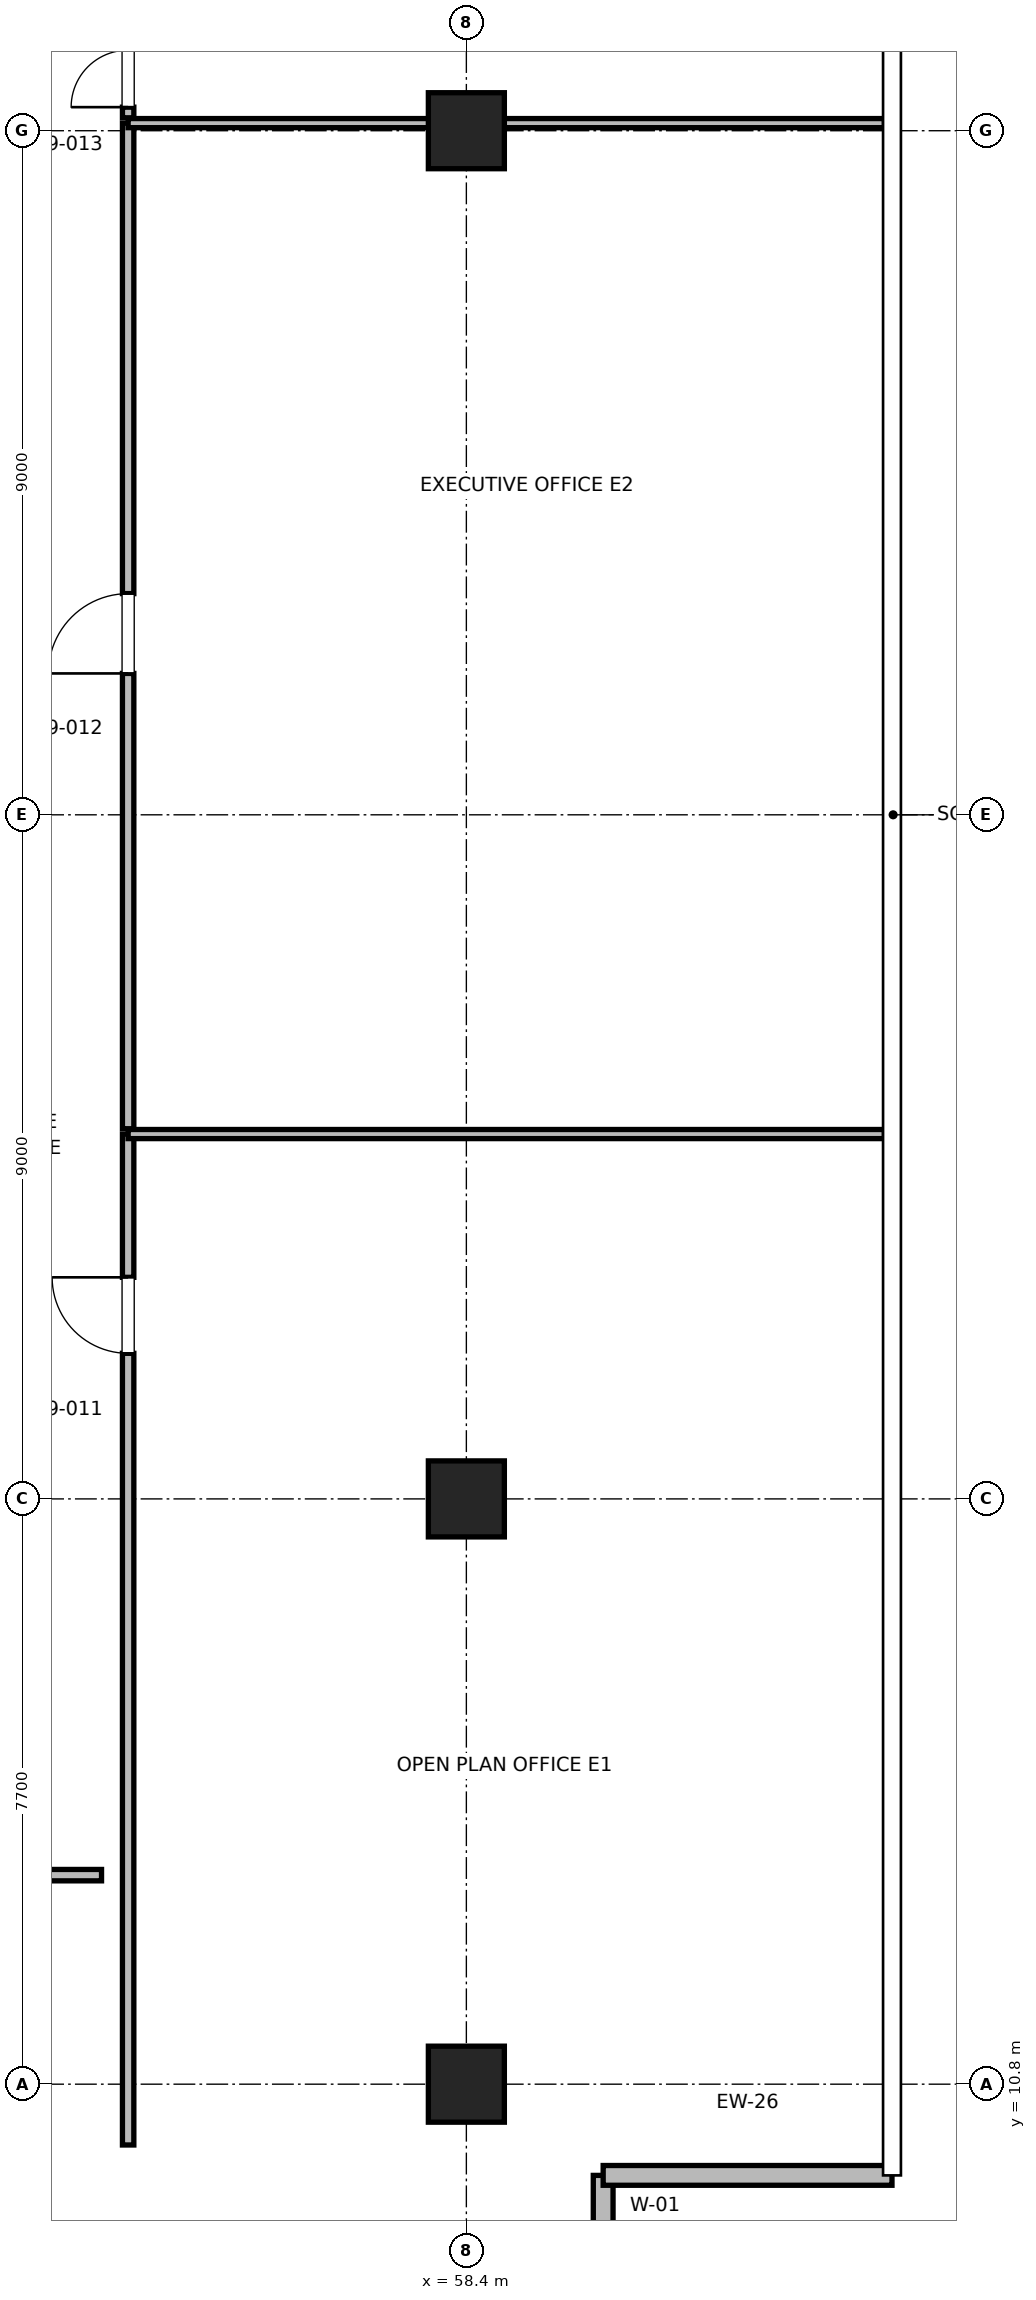
"""IFC4 building model, lengths in metres.
Left out: names, types, materials, properties, quantities, classifications, styles, units other than length and angle.
Written with IfcOpenShell. Run it as: python <this file> out.ifc"""

import sys

from ifc_helpers import new_model, si_unit, direction, frame, frame_2d, origin, origin_2d, place, context, subcontext, project, spatial, rectangle, extrude, element, fill, save


model = new_model("IFC4")
c1 = context("Model", 3, precision=1e-05, world=origin(), true_north=direction((0.0, 1.0)))
c2 = subcontext(c1, "Body", "Model", "MODEL_VIEW")
j1 = project(units=[si_unit("LENGTHUNIT", "METRE"), si_unit("PLANEANGLEUNIT", "RADIAN")], contexts=[c1])
p1 = place(None, origin())
s1 = spatial("IfcSite", under=j1, at=p1, CompositionType="ELEMENT")
p2 = place(p1, origin())
s2 = spatial("IfcBuilding", under=s1, at=p2, CompositionType="ELEMENT")
p3 = place(p2, frame((0.0, 0.0, 338.8)))
s3 = spatial("IfcBuildingStorey", under=s2, at=p3, CompositionType="ELEMENT", Elevation=338.8)
for number, where, z_axis, x_axis in (
    (1, (58.4, 18.5, 0.0), (0.0, 0.0, 1.0), (1.0, 0.0, 0.0)),
    (2, (58.4, 36.5, 0.0), (0.0, 0.0, 1.0), (1.0, 0.0, 0.0)),
    (3, (58.4, 10.8, 0.0), (0.0, 0.0, 1.0), (1.0, 0.0, 0.0)),
):
    element("IfcColumn", number, at=place(p3, frame(where, z_axis=z_axis, x_axis=x_axis)), inside=s3, PredefinedType="COLUMN", context=c2, shape_type="SweptSolid", body=[
        extrude(rectangle(XDim=1.0, YDim=1.0, at=origin_2d()), origin(), (0.0, 0.0, 1.0), 4.0),
    ])
p4 = place(p3, frame((60.2, 6.3, 0.0), z_axis=(0.0, 0.0, 1.0), x_axis=(0.0, 1.0, 0.0)))
e4 = element("IfcWall", 4, at=p4, inside=s3, PredefinedType="PARAPET", context=c2, shape_type="SweptSolid", body=[
    extrude(rectangle(XDim=3.3, YDim=0.26, at=frame_2d((1.65, 0.0))), origin(), (0.0, 0.0, 1.0), 3.7),
])
p5 = place(p4, frame((0.95, 0.0, 0.85)))
e5 = element("IfcOpeningElement", 5, at=p5, cuts=e4, PredefinedType="OPENING", context=c2, shape_type="SweptSolid", body=[
    extrude(rectangle(XDim=1.4, YDim=2.0, at=frame_2d((0.7, 1.0))), frame((0.0, 0.13, 0.0), z_axis=(0.0, -1.0, 0.0), x_axis=(1.0, 0.0, 0.0)), (0.0, 0.0, 1.0), 0.26),
])
p6 = place(p3, frame((60.2, 9.6, 0.0), z_axis=(0.0, 0.0, 1.0), x_axis=(1.0, 0.0, 0.0)))
e6 = element("IfcWall", 6, at=p6, inside=s3, PredefinedType="PARAPET", context=c2, shape_type="SweptSolid", body=[
    extrude(rectangle(XDim=3.8, YDim=0.26, at=frame_2d((1.9, 0.0))), origin(), (0.0, 0.0, 1.0), 3.7),
])
p7 = place(p3, frame((48.23, 13.55, 0.0), z_axis=(0.0, 0.0, 1.0), x_axis=(1.0, 0.0, 0.0)))
e7 = element("IfcWall", 7, at=p7, inside=s3, PredefinedType="PARTITIONING", context=c2, shape_type="SweptSolid", body=[
    extrude(rectangle(XDim=5.37, YDim=0.15, at=frame_2d((2.685, 0.0))), origin(), (0.0, 0.0, 1.0), 2.753),
])
p8 = place(p7, frame((2.135, 0.0, 0.0)))
e8 = element("IfcOpeningElement", 8, at=p8, cuts=e7, PredefinedType="OPENING", context=c2, shape_type="SweptSolid", body=[
    extrude(rectangle(XDim=1.0, YDim=2.15, at=frame_2d((0.5, 1.075))), frame((0.0, 0.075, 0.0), z_axis=(0.0, -1.0, 0.0), x_axis=(1.0, 0.0, 0.0)), (0.0, 0.0, 1.0), 0.15),
])
p9 = place(p3, frame((53.95, 10.0, 0.0), z_axis=(0.0, 0.0, 1.0), x_axis=(0.0, 1.0, 0.0)))
e9 = element("IfcWall", 9, at=p9, inside=s3, PredefinedType="PARTITIONING", context=c2, shape_type="SweptSolid", body=[
    extrude(rectangle(XDim=13.3, YDim=0.15, at=frame_2d((6.65, 0.0))), origin(), (0.0, 0.0, 1.0), 2.753),
])
p10 = place(p9, frame((10.415, 0.0, 0.0)))
e10 = element("IfcOpeningElement", 10, at=p10, cuts=e9, PredefinedType="OPENING", context=c2, shape_type="SweptSolid", body=[
    extrude(rectangle(XDim=1.0, YDim=2.15, at=frame_2d((0.5, 1.075))), frame((0.0, 0.075, 0.0), z_axis=(0.0, -1.0, 0.0), x_axis=(1.0, 0.0, 0.0)), (0.0, 0.0, 1.0), 0.15),
])
p11 = place(p3, frame((53.95, 23.3, 0.0), z_axis=(0.0, 0.0, 1.0), x_axis=(1.0, 0.0, 0.0)))
e11 = element("IfcWall", 11, at=p11, inside=s3, PredefinedType="PARTITIONING", context=c2, shape_type="SweptSolid", body=[
    extrude(rectangle(XDim=9.95, YDim=0.12, at=frame_2d((4.975, 0.0))), origin(), (0.0, 0.0, 1.0), 2.753),
])
p12 = place(p3, frame((53.95, 23.37, 0.0), z_axis=(0.0, 0.0, 1.0), x_axis=(0.0, 1.0, 0.0)))
e12 = element("IfcWall", 12, at=p12, inside=s3, PredefinedType="PARTITIONING", context=c2, shape_type="SweptSolid", body=[
    extrude(rectangle(XDim=13.23, YDim=0.15, at=frame_2d((6.615, 0.0))), origin(), (0.0, 0.0, 1.0), 2.753),
])
p13 = place(p12, frame((5.99, 0.0, 0.0)))
e13 = element("IfcOpeningElement", 13, at=p13, cuts=e12, PredefinedType="OPENING", context=c2, shape_type="SweptSolid", body=[
    extrude(rectangle(XDim=1.05, YDim=2.2, at=frame_2d((0.525, 1.1))), frame((0.0, 0.075, 0.0), z_axis=(0.0, -1.0, 0.0), x_axis=(1.0, 0.0, 0.0)), (0.0, 0.0, 1.0), 0.15),
])
p14 = place(p3, frame((53.95, 36.6, 0.0), z_axis=(0.0, 0.0, 1.0), x_axis=(1.0, 0.0, 0.0)))
e14 = element("IfcWall", 14, at=p14, inside=s3, PredefinedType="PARTITIONING", context=c2, shape_type="SweptSolid", body=[
    extrude(rectangle(XDim=9.95, YDim=0.12, at=frame_2d((4.975, 0.0))), origin(), (0.0, 0.0, 1.0), 2.753),
])
p15 = place(p3, frame((53.95, 36.67, 0.0), z_axis=(0.0, 0.0, 1.0), x_axis=(0.0, 1.0, 0.0)))
e15 = element("IfcWall", 15, at=p15, inside=s3, PredefinedType="PARTITIONING", context=c2, shape_type="SweptSolid", body=[
    extrude(rectangle(XDim=8.33, YDim=0.15, at=frame_2d((4.165, 0.0))), origin(), (0.0, 0.0, 1.0), 2.753),
])
p16 = place(p15, frame((0.14, 0.0, 0.0)))
e16 = element("IfcOpeningElement", 16, at=p16, cuts=e15, PredefinedType="OPENING", context=c2, shape_type="SweptSolid", body=[
    extrude(rectangle(XDim=1.5, YDim=2.25, at=frame_2d((0.75, 1.125))), frame((0.0, 0.075, 0.0), z_axis=(0.0, -1.0, 0.0), x_axis=(1.0, 0.0, 0.0)), (0.0, 0.0, 1.0), 0.15),
])
p17 = place(p10, origin())
e17 = element("IfcDoor", 17, at=p17, inside=s3, OperationType="SINGLE_SWING_RIGHT", PredefinedType="DOOR", context=c2, shape_type="SweptSolid", body=[
    extrude(rectangle(XDim=1.0, YDim=2.15, at=frame_2d((0.5, 1.075))), frame((0.0, 0.025, 0.0), z_axis=(0.0, -1.0, 0.0), x_axis=(1.0, 0.0, 0.0)), (0.0, 0.0, 1.0), 0.05),
])
fill(e10, e17)
p18 = place(p13, origin())
e18 = element("IfcDoor", 18, at=p18, inside=s3, OperationType="SINGLE_SWING_LEFT", PredefinedType="DOOR", context=c2, shape_type="SweptSolid", body=[
    extrude(rectangle(XDim=1.05, YDim=2.2, at=frame_2d((0.525, 1.1))), frame((0.0, 0.025, 0.0), z_axis=(0.0, -1.0, 0.0), x_axis=(1.0, 0.0, 0.0)), (0.0, 0.0, 1.0), 0.05),
])
fill(e13, e18)
p19 = place(p16, origin())
e19 = element("IfcDoor", 19, at=p19, inside=s3, OperationType="DOUBLE_DOOR_SINGLE_SWING", PredefinedType="DOOR", context=c2, shape_type="SweptSolid", body=[
    extrude(rectangle(XDim=1.5, YDim=2.25, at=frame_2d((0.75, 1.125))), frame((0.0, 0.025, 0.0), z_axis=(0.0, -1.0, 0.0), x_axis=(1.0, 0.0, 0.0)), (0.0, 0.0, 1.0), 0.05),
])
fill(e16, e19)
save(model, sys.argv[1])
